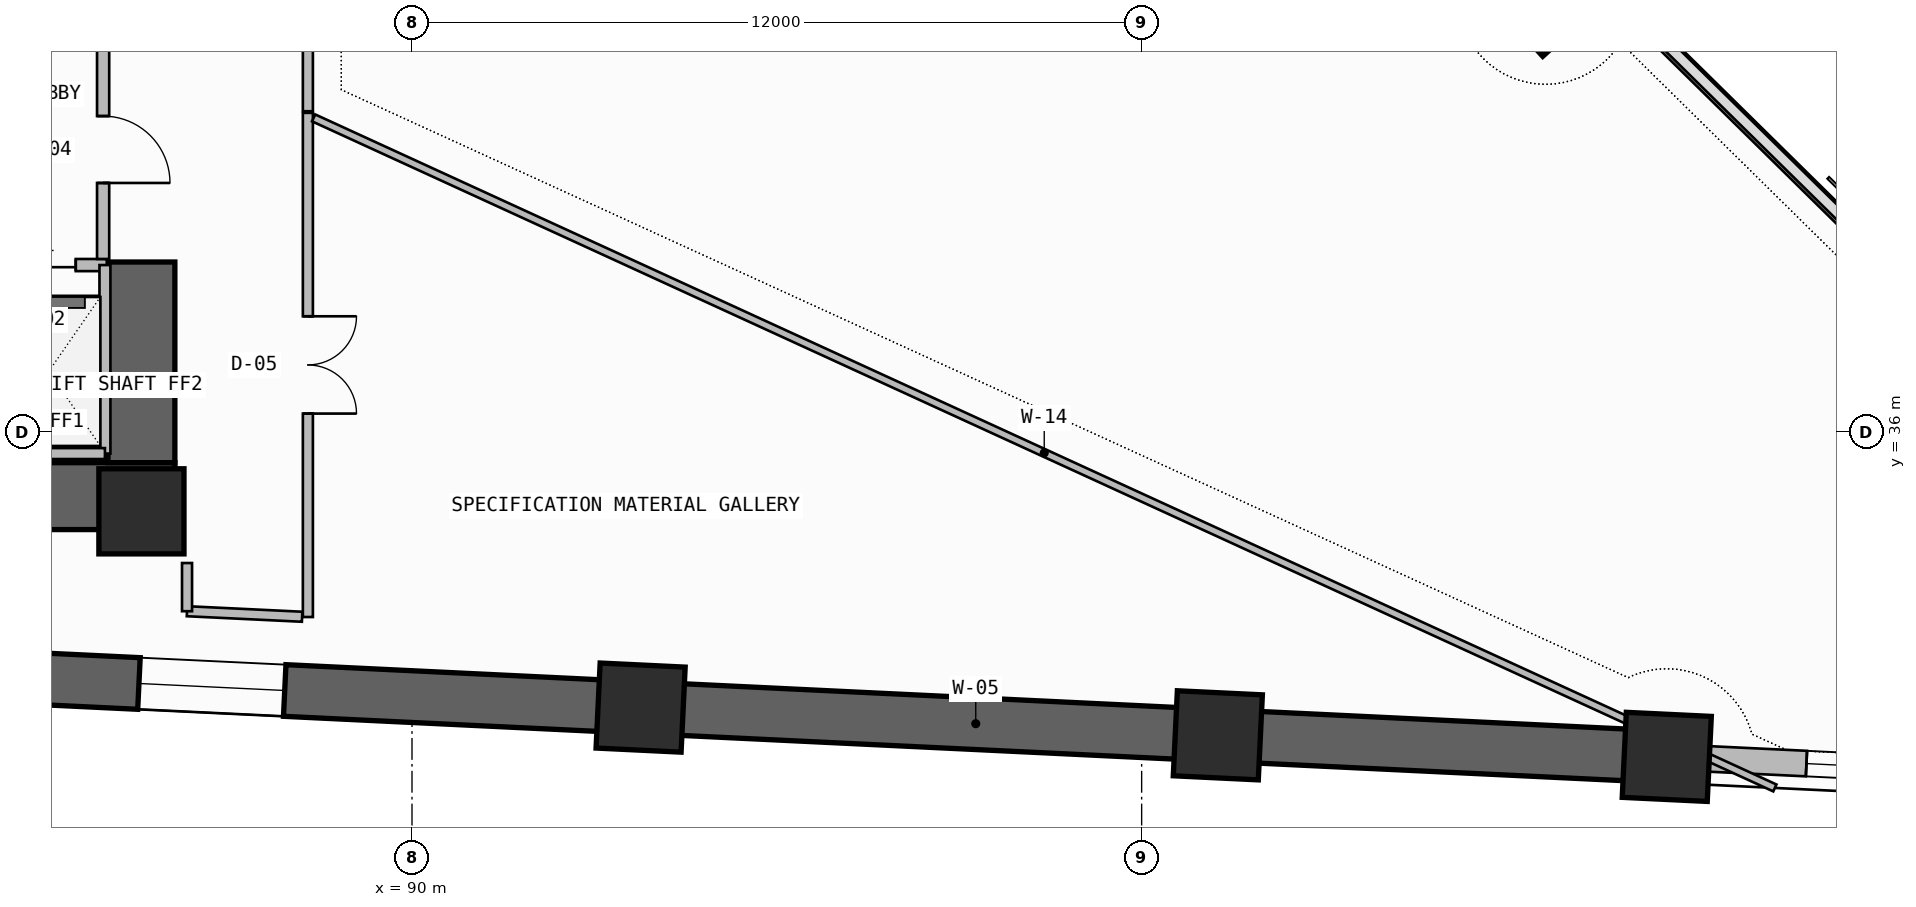
"""IFC4 building model, lengths in metres.
Left out: names, types, materials, properties, quantities, classifications, styles, units other than length and angle.
Written with IfcOpenShell. Run it as: python <this file> out.ifc"""

import sys

from ifc_helpers import new_model, si_unit, direction, frame, frame_2d, origin, origin_2d, place, context, subcontext, project, spatial, rectangle, extrude, element, fill, save


model = new_model("IFC4")
c1 = context("Model", 3, precision=1e-05, world=origin(), true_north=direction((0.0, 1.0)))
c2 = subcontext(c1, "Body", "Model", "MODEL_VIEW")
j1 = project(units=[si_unit("LENGTHUNIT", "METRE"), si_unit("PLANEANGLEUNIT", "RADIAN")], contexts=[c1])
p1 = place(None, origin())
s1 = spatial("IfcSite", under=j1, at=p1, CompositionType="ELEMENT")
p2 = place(p1, origin())
s2 = spatial("IfcBuilding", under=s1, at=p2, CompositionType="ELEMENT")
p3 = place(p2, frame((0.0, 0.0, 44.7)))
s3 = spatial("IfcBuildingStorey", under=s2, at=p3, CompositionType="ELEMENT", Elevation=44.7)
p4 = place(p3, frame((71.8, 34.95, -0.2), z_axis=(0.0, 0.0, 1.0), x_axis=(1.0, 0.0, 0.0)))
e1 = element("IfcWall", 1, at=p4, inside=s3, PredefinedType="SHEAR", context=c2, shape_type="SweptSolid", body=[
    extrude(rectangle(XDim=14.3, YDim=1.1, at=frame_2d((7.15, 0.0))), origin(), (0.0, 0.0, 1.0), 3.54),
])
p5 = place(p3, frame((85.55, 35.5, -0.2), z_axis=(0.0, 0.0, 1.0), x_axis=(0.0, 1.0, 0.0)))
e2 = element("IfcWall", 2, at=p5, inside=s3, PredefinedType="SHEAR", context=c2, shape_type="SweptSolid", body=[
    extrude(rectangle(XDim=3.3, YDim=1.1, at=frame_2d((1.65, 0.0))), origin(), (0.0, 0.0, 1.0), 3.54),
])
for number, where, z_axis, x_axis in (
    (3, (85.55, 34.7, 0.0), (0.0, 0.0, 1.0), (1.0, 0.0, 0.0)),
    (4, (93.76, 31.472, 0.0), (0.0, 0.0, 1.0), (-0.999, 0.048, 0.0)),
    (5, (103.253, 31.017, 0.0), (0.0, 0.0, 1.0), (-0.999, 0.048, 0.0)),
    (6, (110.636, 30.662, 0.0), (0.0, 0.0, 1.0), (-0.999, 0.048, 0.0)),
    (7, (108.644, 43.172, 0.0), (0.0, 0.0, 1.0), (0.74, 0.672, 0.0)),
):
    element("IfcColumn", number, at=place(p3, frame(where, z_axis=z_axis, x_axis=x_axis)), inside=s3, PredefinedType="COLUMN", context=c2, shape_type="SweptSolid", body=[
        extrude(rectangle(XDim=1.4, YDim=1.4, at=origin_2d()), origin(), (0.0, 0.0, 1.0), 3.6),
    ])
p6 = place(p3, frame((83.212, 31.979, -0.2), z_axis=(0.0, 0.0, 1.0), x_axis=(0.998848235141, -0.047981279227, 0.0)))
e8 = element("IfcWall", 8, at=p6, inside=s3, PredefinedType="SHEAR", context=c2, shape_type="SweptSolid", body=[
    extrude(rectangle(XDim=27.456, YDim=0.85, at=frame_2d((13.728, 0.0))), origin(), (0.0, 0.0, 1.0), 3.54),
])
p7 = place(p6, frame((2.3, 0.0, 1.2)))
e9 = element("IfcOpeningElement", 9, at=p7, cuts=e8, PredefinedType="OPENING", context=c2, shape_type="SweptSolid", body=[
    extrude(rectangle(XDim=2.4, YDim=0.9, at=frame_2d((1.2, 0.45))), frame((0.0, 0.435, 0.0), z_axis=(0.0, -1.0, 0.0), x_axis=(1.0, 0.0, 0.0)), (0.0, 0.0, 1.0), 0.87),
])
p8 = place(p3, frame((110.636, 30.662, 0.0), z_axis=(0.0, 0.0, 1.0), x_axis=(0.998847872759, -0.047988822508, 0.0)))
e10 = element("IfcWall", 10, at=p8, inside=s3, PredefinedType="SOLIDWALL", context=c2, shape_type="SweptSolid", body=[
    extrude(rectangle(XDim=7.392, YDim=0.42, at=frame_2d((3.696, 0.0))), origin(), (0.0, 0.0, 1.0), 2.325),
])
p9 = place(p8, frame((2.3, 0.0, 1.2)))
e11 = element("IfcOpeningElement", 11, at=p9, cuts=e10, PredefinedType="OPENING", context=c2, shape_type="SweptSolid", body=[
    extrude(rectangle(XDim=2.4, YDim=0.9, at=frame_2d((1.2, 0.45))), frame((0.0, 0.22, 0.0), z_axis=(0.0, -1.0, 0.0), x_axis=(1.0, 0.0, 0.0)), (0.0, 0.0, 1.0), 0.44),
])
p10 = place(p3, frame((120.254, 32.848, 0.0), z_axis=(0.0, 0.0, 1.0), x_axis=(-0.71254385441, 0.701627576099, 0.0)))
e12 = element("IfcWall", 12, at=p10, inside=s3, PredefinedType="PARAPET", context=c2, shape_type="SweptSolid", body=[
    extrude(rectangle(XDim=36.142, YDim=0.2, at=frame_2d((18.071, 0.0))), origin(), (0.0, 0.0, 1.0), 1.15),
])
p11 = place(p3, frame((80.72, 38.75, 0.0), z_axis=(0.0, 0.0, 1.0), x_axis=(1.0, 0.0, 0.0)))
e13 = element("IfcWall", 13, at=p11, inside=s3, PredefinedType="SOLIDWALL", context=c2, shape_type="SweptSolid", body=[
    extrude(rectangle(XDim=4.26, YDim=0.2, at=frame_2d((2.13, 0.0))), origin(), (0.0, 0.0, 1.0), 3.34),
])
p12 = place(p11, frame((0.5, 0.0, 0.0)))
e14 = element("IfcOpeningElement", 14, at=p12, cuts=e13, PredefinedType="OPENING", context=c2, shape_type="SweptSolid", body=[
    extrude(rectangle(XDim=1.3, YDim=2.3, at=frame_2d((0.65, 1.15))), frame((0.0, 0.11, 0.0), z_axis=(0.0, -1.0, 0.0), x_axis=(1.0, 0.0, 0.0)), (0.0, 0.0, 1.0), 0.22),
])
p13 = place(p11, frame((2.45, 0.0, 0.0)))
e15 = element("IfcOpeningElement", 15, at=p13, cuts=e13, PredefinedType="OPENING", context=c2, shape_type="SweptSolid", body=[
    extrude(rectangle(XDim=1.3, YDim=2.3, at=frame_2d((0.65, 1.15))), frame((0.0, 0.11, 0.0), z_axis=(0.0, -1.0, 0.0), x_axis=(1.0, 0.0, 0.0)), (0.0, 0.0, 1.0), 0.22),
])
p14 = place(p3, frame((84.95, 35.65, 0.0), z_axis=(0.0, 0.0, 1.0), x_axis=(0.0, 1.0, 0.0)))
e16 = element("IfcWall", 16, at=p14, inside=s3, PredefinedType="SOLIDWALL", context=c2, shape_type="SweptSolid", body=[
    extrude(rectangle(XDim=3.1, YDim=0.18, at=frame_2d((1.55, 0.0))), origin(), (0.0, 0.0, 1.0), 3.34),
])
p15 = place(p3, frame((81.02, 35.65, 0.0), z_axis=(0.0, 0.0, 1.0), x_axis=(1.0, 0.0, 0.0)))
e17 = element("IfcWall", 17, at=p15, inside=s3, PredefinedType="SOLIDWALL", context=c2, shape_type="SweptSolid", body=[
    extrude(rectangle(XDim=3.93, YDim=0.18, at=frame_2d((1.965, 0.0))), origin(), (0.0, 0.0, 1.0), 3.34),
])
p16 = place(p3, frame((84.92, 38.85, 0.0), z_axis=(0.0, 0.0, 1.0), x_axis=(0.0, 1.0, 0.0)))
e18 = element("IfcWall", 18, at=p16, inside=s3, PredefinedType="SOLIDWALL", context=c2, shape_type="SweptSolid", body=[
    extrude(rectangle(XDim=4.83, YDim=0.2, at=frame_2d((2.415, 0.0))), origin(), (0.0, 0.0, 1.0), 3.34),
])
p17 = place(p16, frame((1.25, 0.0, 0.0)))
e19 = element("IfcOpeningElement", 19, at=p17, cuts=e18, PredefinedType="OPENING", context=c2, shape_type="SweptSolid", body=[
    extrude(rectangle(XDim=1.1, YDim=2.2, at=frame_2d((0.55, 1.1))), frame((0.0, 0.11, 0.0), z_axis=(0.0, -1.0, 0.0), x_axis=(1.0, 0.0, 0.0)), (0.0, 0.0, 1.0), 0.22),
])
p18 = place(p3, frame((88.288, 32.962, 0.0), z_axis=(0.0, 0.0, 1.0), x_axis=(0.0, 1.0, 0.0)))
e20 = element("IfcWall", 20, at=p18, inside=s3, PredefinedType="PARTITIONING", context=c2, shape_type="SweptSolid", body=[
    extrude(rectangle(XDim=8.291, YDim=0.165, at=frame_2d((4.146, 0.0))), origin(), (0.0, 0.0, 1.0), 2.725),
])
p19 = place(p18, frame((3.346, 0.0, 0.0)))
e21 = element("IfcOpeningElement", 21, at=p19, cuts=e20, PredefinedType="OPENING", context=c2, shape_type="SweptSolid", body=[
    extrude(rectangle(XDim=1.6, YDim=2.3, at=frame_2d((0.8, 1.15))), frame((0.0, 0.093, 0.0), z_axis=(0.0, -1.0, 0.0), x_axis=(1.0, 0.0, 0.0)), (0.0, 0.0, 1.0), 0.185),
])
p20 = place(p3, frame((86.3, 33.057, 0.0), z_axis=(0.0, 0.0, 1.0), x_axis=(0.9988449969, -0.048048643777, 0.0)))
e22 = element("IfcWall", 22, at=p20, inside=s3, PredefinedType="PARTITIONING", context=c2, shape_type="SweptSolid", body=[
    extrude(rectangle(XDim=1.895, YDim=0.165, at=frame_2d((0.948, 0.0))), origin(), (0.0, 0.0, 1.0), 3.34),
])
p21 = place(p3, frame((86.3, 33.85, 0.0), z_axis=(0.0, 0.0, 1.0), x_axis=(0.0, -1.0, 0.0)))
e23 = element("IfcWall", 23, at=p21, inside=s3, PredefinedType="PARTITIONING", context=c2, shape_type="SweptSolid", body=[
    extrude(rectangle(XDim=0.793, YDim=0.165, at=frame_2d((0.396, 0.0))), origin(), (0.0, 0.0, 1.0), 2.875),
])
p22 = place(p3, frame((88.382, 41.17, 0.0), z_axis=(0.0, 0.0, 1.0), x_axis=(0.908996896227, -0.416802882248, 0.0)))
e24 = element("IfcWall", 24, at=p22, inside=s3, PredefinedType="PARTITIONING", context=c2, shape_type="SweptSolid", body=[
    extrude(rectangle(XDim=26.438, YDim=0.125, at=frame_2d((13.219, 0.0))), origin(), (0.0, 0.0, 1.0), 2.325),
])
p23 = place(p3, frame((88.288, 41.28, 0.0), z_axis=(0.0, 0.0, 1.0), x_axis=(0.0, 1.0, 0.0)))
e25 = element("IfcWall", 25, at=p23, inside=s3, PredefinedType="PARTITIONING", context=c2, shape_type="SweptSolid", body=[
    extrude(rectangle(XDim=7.145, YDim=0.165, at=frame_2d((3.573, 0.0))), origin(), (0.0, 0.0, 1.0), 2.725),
])
p24 = place(p23, frame((3.073, 0.0, 0.0)))
e26 = element("IfcOpeningElement", 26, at=p24, cuts=e25, PredefinedType="OPENING", context=c2, shape_type="SweptSolid", body=[
    extrude(rectangle(XDim=1.0, YDim=2.2, at=frame_2d((0.5, 1.1))), frame((0.0, 0.093, 0.0), z_axis=(0.0, -1.0, 0.0), x_axis=(1.0, 0.0, 0.0)), (0.0, 0.0, 1.0), 0.185),
])
p25 = place(p7, origin())
e27 = element("IfcWindow", 27, at=p25, inside=s3, PartitioningType="SINGLE_PANEL", PredefinedType="WINDOW", context=c2, shape_type="SweptSolid", body=[
    extrude(rectangle(XDim=2.4, YDim=0.9, at=frame_2d((1.2, 0.45))), frame((0.0, 0.03, 0.0), z_axis=(0.0, -1.0, 0.0), x_axis=(1.0, 0.0, 0.0)), (0.0, 0.0, 1.0), 0.06),
])
fill(e9, e27)
p26 = place(p9, origin())
e28 = element("IfcWindow", 28, at=p26, inside=s3, PartitioningType="SINGLE_PANEL", PredefinedType="WINDOW", context=c2, shape_type="SweptSolid", body=[
    extrude(rectangle(XDim=2.4, YDim=0.9, at=frame_2d((1.2, 0.45))), frame((0.0, 0.03, 0.0), z_axis=(0.0, -1.0, 0.0), x_axis=(1.0, 0.0, 0.0)), (0.0, 0.0, 1.0), 0.06),
])
fill(e11, e28)
p27 = place(p13, origin())
e29 = element("IfcDoor", 29, at=p27, inside=s3, OperationType="DOUBLE_DOOR_SLIDING", PredefinedType="DOOR", context=c2, shape_type="SweptSolid", body=[
    extrude(rectangle(XDim=1.3, YDim=2.3, at=frame_2d((0.65, 1.15))), frame((0.0, 0.025, 0.0), z_axis=(0.0, -1.0, 0.0), x_axis=(1.0, 0.0, 0.0)), (0.0, 0.0, 1.0), 0.05),
])
fill(e15, e29)
p28 = place(p17, frame((1.1, 0.0, 0.0), z_axis=(0.0, 0.0, 1.0), x_axis=(-1.0, 0.0, 0.0)))
e30 = element("IfcDoor", 30, at=p28, inside=s3, OperationType="SINGLE_SWING_RIGHT", PredefinedType="DOOR", context=c2, shape_type="SweptSolid", body=[
    extrude(rectangle(XDim=1.1, YDim=2.2, at=frame_2d((0.55, 1.1))), frame((0.0, 0.025, 0.0), z_axis=(0.0, -1.0, 0.0), x_axis=(1.0, 0.0, 0.0)), (0.0, 0.0, 1.0), 0.05),
])
fill(e19, e30)
p29 = place(p19, frame((1.6, 0.0, 0.0), z_axis=(0.0, 0.0, 1.0), x_axis=(-1.0, 0.0, 0.0)))
e31 = element("IfcDoor", 31, at=p29, inside=s3, OperationType="DOUBLE_DOOR_SINGLE_SWING", PredefinedType="DOOR", context=c2, shape_type="SweptSolid", body=[
    extrude(rectangle(XDim=1.6, YDim=2.3, at=frame_2d((0.8, 1.15))), frame((0.0, 0.025, 0.0), z_axis=(0.0, -1.0, 0.0), x_axis=(1.0, 0.0, 0.0)), (0.0, 0.0, 1.0), 0.05),
])
fill(e21, e31)
save(model, sys.argv[1])
